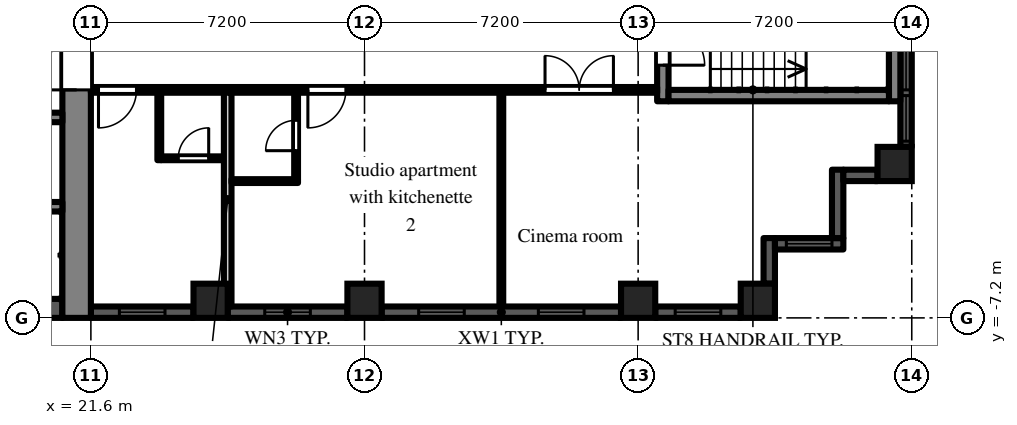
"""IFC4 building model, lengths in metres.
Left out: names, types, materials, properties, quantities, classifications, styles, units other than length and angle.
Written with IfcOpenShell. Run it as: python <this file> out.ifc"""

import sys

from ifc_helpers import new_model, si_unit, direction, frame, frame_2d, origin, origin_2d, place, context, subcontext, project, spatial, rectangle, extrude, element, fill, save


model = new_model("IFC4")
c1 = context("Model", 3, precision=1e-05, world=origin(), true_north=direction((0.0, 1.0)))
c2 = subcontext(c1, "Body", "Model", "MODEL_VIEW")
j1 = project(units=[si_unit("LENGTHUNIT", "METRE"), si_unit("PLANEANGLEUNIT", "RADIAN")], contexts=[c1])
p1 = place(None, origin())
s1 = spatial("IfcSite", under=j1, at=p1, CompositionType="ELEMENT")
p2 = place(p1, origin())
s2 = spatial("IfcBuilding", under=s1, at=p2, CompositionType="ELEMENT")
p3 = place(p2, frame((0.0, 0.0, 108.9)))
s3 = spatial("IfcBuildingStorey", under=s2, at=p3, CompositionType="ELEMENT", Elevation=108.9)
for number, where, z_axis, x_axis in (
    (1, (24.75, -6.75, 0.0), (0.0, 0.0, 1.0), (1.0, 0.0, 0.0)),
    (2, (28.8, -6.75, 0.0), (0.0, 0.0, 1.0), (1.0, 0.0, 0.0)),
    (3, (36.0, -6.75, 0.0), (0.0, 0.0, 1.0), (1.0, 0.0, 0.0)),
    (4, (39.15, -6.75, 0.0), (0.0, 0.0, 1.0), (1.0, 0.0, 0.0)),
    (5, (42.75, -3.15, 0.0), (0.0, 0.0, 1.0), (1.0, 0.0, 0.0)),
):
    element("IfcColumn", number, at=place(p3, frame(where, z_axis=z_axis, x_axis=x_axis)), inside=s3, PredefinedType="COLUMN", context=c2, shape_type="SweptSolid", body=[
        extrude(rectangle(XDim=0.9, YDim=0.9, at=origin_2d()), origin(), (0.0, 0.0, 1.0), 3.0),
    ])
p4 = place(p3, frame((21.6, -7.05, 0.0), z_axis=(0.0, 0.0, 1.0), x_axis=(1.0, 0.0, 0.0)))
e6 = element("IfcWall", 6, at=p4, inside=s3, PredefinedType="SOLIDWALL", context=c2, shape_type="SweptSolid", body=[
    extrude(rectangle(XDim=2.7, YDim=0.3, at=frame_2d((1.35, 0.0))), origin(), (0.0, 0.0, 1.0), 2.2),
])
p5 = place(p4, frame((0.75, 0.0, 0.2)))
e7 = element("IfcOpeningElement", 7, at=p5, cuts=e6, PredefinedType="OPENING", context=c2, shape_type="SweptSolid", body=[
    extrude(rectangle(XDim=1.2, YDim=1.85, at=frame_2d((0.6, 0.925))), frame((0.0, 0.16, 0.0), z_axis=(0.0, -1.0, 0.0), x_axis=(1.0, 0.0, 0.0)), (0.0, 0.0, 1.0), 0.32),
])
p6 = place(p3, frame((25.2, -7.05, 0.0), z_axis=(0.0, 0.0, 1.0), x_axis=(1.0, 0.0, 0.0)))
e8 = element("IfcWall", 8, at=p6, inside=s3, PredefinedType="SOLIDWALL", context=c2, shape_type="SweptSolid", body=[
    extrude(rectangle(XDim=3.15, YDim=0.3, at=frame_2d((1.575, 0.0))), origin(), (0.0, 0.0, 1.0), 2.2),
])
p7 = place(p6, frame((0.975, 0.0, 0.2)))
e9 = element("IfcOpeningElement", 9, at=p7, cuts=e8, PredefinedType="OPENING", context=c2, shape_type="SweptSolid", body=[
    extrude(rectangle(XDim=1.2, YDim=1.85, at=frame_2d((0.6, 0.925))), frame((0.0, 0.16, 0.0), z_axis=(0.0, -1.0, 0.0), x_axis=(1.0, 0.0, 0.0)), (0.0, 0.0, 1.0), 0.32),
])
p8 = place(p3, frame((29.25, -7.05, 0.0), z_axis=(0.0, 0.0, 1.0), x_axis=(1.0, 0.0, 0.0)))
e10 = element("IfcWall", 10, at=p8, inside=s3, PredefinedType="SOLIDWALL", context=c2, shape_type="SweptSolid", body=[
    extrude(rectangle(XDim=6.3, YDim=0.3, at=frame_2d((3.15, 0.0))), origin(), (0.0, 0.0, 1.0), 2.2),
])
p9 = place(p8, frame((0.975, 0.0, 0.2)))
e11 = element("IfcOpeningElement", 11, at=p9, cuts=e10, PredefinedType="OPENING", context=c2, shape_type="SweptSolid", body=[
    extrude(rectangle(XDim=1.2, YDim=1.85, at=frame_2d((0.6, 0.925))), frame((0.0, 0.16, 0.0), z_axis=(0.0, -1.0, 0.0), x_axis=(1.0, 0.0, 0.0)), (0.0, 0.0, 1.0), 0.32),
])
p10 = place(p8, frame((4.125, 0.0, 0.2)))
e12 = element("IfcOpeningElement", 12, at=p10, cuts=e10, PredefinedType="OPENING", context=c2, shape_type="SweptSolid", body=[
    extrude(rectangle(XDim=1.2, YDim=1.85, at=frame_2d((0.6, 0.925))), frame((0.0, 0.16, 0.0), z_axis=(0.0, -1.0, 0.0), x_axis=(1.0, 0.0, 0.0)), (0.0, 0.0, 1.0), 0.32),
])
p11 = place(p3, frame((36.45, -7.05, 0.0), z_axis=(0.0, 0.0, 1.0), x_axis=(1.0, 0.0, 0.0)))
e13 = element("IfcWall", 13, at=p11, inside=s3, PredefinedType="SOLIDWALL", context=c2, shape_type="SweptSolid", body=[
    extrude(rectangle(XDim=2.25, YDim=0.3, at=frame_2d((1.125, 0.0))), origin(), (0.0, 0.0, 1.0), 2.2),
])
p12 = place(p11, frame((0.525, 0.0, 0.2)))
e14 = element("IfcOpeningElement", 14, at=p12, cuts=e13, PredefinedType="OPENING", context=c2, shape_type="SweptSolid", body=[
    extrude(rectangle(XDim=1.2, YDim=1.85, at=frame_2d((0.6, 0.925))), frame((0.0, 0.16, 0.0), z_axis=(0.0, -1.0, 0.0), x_axis=(1.0, 0.0, 0.0)), (0.0, 0.0, 1.0), 0.32),
])
p13 = place(p3, frame((39.45, -6.3, 0.0), z_axis=(0.0, 0.0, 1.0), x_axis=(0.0, 1.0, 0.0)))
e15 = element("IfcWall", 15, at=p13, inside=s3, PredefinedType="SOLIDWALL", context=c2, shape_type="SweptSolid", body=[
    extrude(rectangle(XDim=1.2, YDim=0.3, at=frame_2d((0.6, 0.0))), origin(), (0.0, 0.0, 1.0), 2.55),
])
p14 = place(p3, frame((39.6, -5.25, 0.0), z_axis=(0.0, 0.0, 1.0), x_axis=(1.0, 0.0, 0.0)))
e16 = element("IfcWall", 16, at=p14, inside=s3, PredefinedType="SOLIDWALL", context=c2, shape_type="SweptSolid", body=[
    extrude(rectangle(XDim=1.8, YDim=0.3, at=frame_2d((0.9, 0.0))), origin(), (0.0, 0.0, 1.0), 2.55),
])
p15 = place(p14, frame((0.3, 0.0, 0.2)))
e17 = element("IfcOpeningElement", 17, at=p15, cuts=e16, PredefinedType="OPENING", context=c2, shape_type="SweptSolid", body=[
    extrude(rectangle(XDim=1.2, YDim=1.85, at=frame_2d((0.6, 0.925))), frame((0.0, 0.16, 0.0), z_axis=(0.0, -1.0, 0.0), x_axis=(1.0, 0.0, 0.0)), (0.0, 0.0, 1.0), 0.32),
])
p16 = place(p3, frame((41.25, -5.1, 0.0), z_axis=(0.0, 0.0, 1.0), x_axis=(0.0, 1.0, 0.0)))
e18 = element("IfcWall", 18, at=p16, inside=s3, PredefinedType="SOLIDWALL", context=c2, shape_type="SweptSolid", body=[
    extrude(rectangle(XDim=1.8, YDim=0.3, at=frame_2d((0.9, 0.0))), origin(), (0.0, 0.0, 1.0), 2.55),
])
p17 = place(p3, frame((41.4, -3.45, 0.0), z_axis=(0.0, 0.0, 1.0), x_axis=(1.0, 0.0, 0.0)))
e19 = element("IfcWall", 19, at=p17, inside=s3, PredefinedType="SOLIDWALL", context=c2, shape_type="SweptSolid", body=[
    extrude(rectangle(XDim=0.9, YDim=0.3, at=frame_2d((0.45, 0.0))), origin(), (0.0, 0.0, 1.0), 2.55),
])
p18 = place(p3, frame((43.05, -2.7, 0.0), z_axis=(0.0, 0.0, 1.0), x_axis=(0.0, 1.0, 0.0)))
e20 = element("IfcWall", 20, at=p18, inside=s3, PredefinedType="SOLIDWALL", context=c2, shape_type="SweptSolid", body=[
    extrude(rectangle(XDim=5.4, YDim=0.3, at=frame_2d((2.7, 0.0))), origin(), (0.0, 0.0, 1.0), 2.2),
])
p19 = place(p18, frame((1.5, 0.0, 0.2)))
e21 = element("IfcOpeningElement", 21, at=p19, cuts=e20, PredefinedType="OPENING", context=c2, shape_type="SweptSolid", body=[
    extrude(rectangle(XDim=2.4, YDim=1.85, at=frame_2d((1.2, 0.925))), frame((0.0, 0.16, 0.0), z_axis=(0.0, -1.0, 0.0), x_axis=(1.0, 0.0, 0.0)), (0.0, 0.0, 1.0), 0.32),
])
p20 = place(p18, frame((0.15, 0.0, 0.2)))
e22 = element("IfcOpeningElement", 22, at=p20, cuts=e20, PredefinedType="OPENING", context=c2, shape_type="SweptSolid", body=[
    extrude(rectangle(XDim=1.2, YDim=1.85, at=frame_2d((0.6, 0.925))), frame((0.0, 0.16, 0.0), z_axis=(0.0, -1.0, 0.0), x_axis=(1.0, 0.0, 0.0)), (0.0, 0.0, 1.0), 0.32),
])
p21 = place(p18, frame((4.05, 0.0, 0.2)))
e23 = element("IfcOpeningElement", 23, at=p21, cuts=e20, PredefinedType="OPENING", context=c2, shape_type="SweptSolid", body=[
    extrude(rectangle(XDim=1.2, YDim=1.85, at=frame_2d((0.6, 0.925))), frame((0.0, 0.16, 0.0), z_axis=(0.0, -1.0, 0.0), x_axis=(1.0, 0.0, 0.0)), (0.0, 0.0, 1.0), 0.32),
])
p22 = place(p3, frame((21.225, -7.2, 0.0), z_axis=(0.0, 0.0, 1.0), x_axis=(0.0, 1.0, 0.0)))
e24 = element("IfcWall", 24, at=p22, inside=s3, PredefinedType="SHEAR", context=c2, shape_type="SweptSolid", body=[
    extrude(rectangle(XDim=14.4, YDim=0.75, at=frame_2d((7.2, 0.0))), origin(), (0.0, 0.0, 1.0), 2.55),
])
p23 = place(p22, frame((6.0, 0.0, 0.0)))
e25 = element("IfcOpeningElement", 25, at=p23, cuts=e24, PredefinedType="OPENING", context=c2, shape_type="SweptSolid", body=[
    extrude(rectangle(XDim=2.4, YDim=2.2, at=frame_2d((1.2, 1.1))), frame((0.0, 0.385, 0.0), z_axis=(0.0, -1.0, 0.0), x_axis=(1.0, 0.0, 0.0)), (0.0, 0.0, 1.0), 0.77),
])
p24 = place(p3, frame((7.9, -6.95, 0.0), z_axis=(0.0, 0.0, 1.0), x_axis=(1.0, 0.0, 0.0)))
e26 = element("IfcWall", 26, at=p24, inside=s3, PredefinedType="SHEAR", context=c2, shape_type="SweptSolid", body=[
    extrude(rectangle(XDim=12.95, YDim=0.5, at=frame_2d((6.475, 0.0))), origin(), (0.0, 0.0, 1.0), 2.55),
])
p25 = place(p3, frame((7.9, -1.925, 0.0), z_axis=(0.0, 0.0, 1.0), x_axis=(1.0, 0.0, 0.0)))
e27 = element("IfcWall", 27, at=p25, inside=s3, PredefinedType="SHEAR", context=c2, shape_type="SweptSolid", body=[
    extrude(rectangle(XDim=12.95, YDim=0.25, at=frame_2d((6.475, 0.0))), origin(), (0.0, 0.0, 1.0), 2.55),
])
p26 = place(p25, frame((4.825, 0.0, 0.0)))
e28 = element("IfcOpeningElement", 28, at=p26, cuts=e27, PredefinedType="OPENING", context=c2, shape_type="SweptSolid", body=[
    extrude(rectangle(XDim=1.1, YDim=2.1, at=frame_2d((0.55, 1.05))), frame((0.0, 0.135, 0.0), z_axis=(0.0, -1.0, 0.0), x_axis=(1.0, 0.0, 0.0)), (0.0, 0.0, 1.0), 0.27),
])
p27 = place(p25, frame((7.025, 0.0, 0.0)))
e29 = element("IfcOpeningElement", 29, at=p27, cuts=e27, PredefinedType="OPENING", context=c2, shape_type="SweptSolid", body=[
    extrude(rectangle(XDim=1.1, YDim=2.1, at=frame_2d((0.55, 1.05))), frame((0.0, 0.135, 0.0), z_axis=(0.0, -1.0, 0.0), x_axis=(1.0, 0.0, 0.0)), (0.0, 0.0, 1.0), 0.27),
])
p28 = place(p25, frame((9.225, 0.0, 0.0)))
e30 = element("IfcOpeningElement", 30, at=p28, cuts=e27, PredefinedType="OPENING", context=c2, shape_type="SweptSolid", body=[
    extrude(rectangle(XDim=1.1, YDim=2.1, at=frame_2d((0.55, 1.05))), frame((0.0, 0.135, 0.0), z_axis=(0.0, -1.0, 0.0), x_axis=(1.0, 0.0, 0.0)), (0.0, 0.0, 1.0), 0.27),
])
p29 = place(p25, frame((0.525, 0.0, 0.0)))
e31 = element("IfcOpeningElement", 31, at=p29, cuts=e27, PredefinedType="OPENING", context=c2, shape_type="SweptSolid", body=[
    extrude(rectangle(XDim=0.9, YDim=2.1, at=frame_2d((0.45, 1.05))), frame((0.0, 0.135, 0.0), z_axis=(0.0, -1.0, 0.0), x_axis=(1.0, 0.0, 0.0)), (0.0, 0.0, 1.0), 0.27),
])
p30 = place(p25, frame((2.625, 0.0, 0.0)))
e32 = element("IfcOpeningElement", 32, at=p30, cuts=e27, PredefinedType="OPENING", context=c2, shape_type="SweptSolid", body=[
    extrude(rectangle(XDim=1.1, YDim=2.1, at=frame_2d((0.55, 1.05))), frame((0.0, 0.135, 0.0), z_axis=(0.0, -1.0, 0.0), x_axis=(1.0, 0.0, 0.0)), (0.0, 0.0, 1.0), 0.27),
])
p31 = place(p3, frame((12.3, -4.275, 0.0), z_axis=(0.0, 0.0, 1.0), x_axis=(1.0, 0.0, 0.0)))
e33 = element("IfcWall", 33, at=p31, inside=s3, PredefinedType="SHEAR", context=c2, shape_type="SweptSolid", body=[
    extrude(rectangle(XDim=8.55, YDim=0.25, at=frame_2d((4.275, 0.0))), origin(), (0.0, 0.0, 1.0), 2.55),
])
p32 = place(p3, frame((36.65, -1.5, 0.0), z_axis=(0.0, 0.0, 1.0), x_axis=(0.0, 1.0, 0.0)))
e34 = element("IfcWall", 34, at=p32, inside=s3, PredefinedType="SHEAR", context=c2, shape_type="SweptSolid", body=[
    extrude(rectangle(XDim=3.0, YDim=0.3, at=frame_2d((1.5, 0.0))), origin(), (0.0, 0.0, 1.0), 2.55),
])
p33 = place(p32, frame((0.95, 0.0, 0.0)))
e35 = element("IfcOpeningElement", 35, at=p33, cuts=e34, PredefinedType="OPENING", context=c2, shape_type="SweptSolid", body=[
    extrude(rectangle(XDim=1.1, YDim=2.1, at=frame_2d((0.55, 1.05))), frame((0.0, 0.16, 0.0), z_axis=(0.0, -1.0, 0.0), x_axis=(1.0, 0.0, 0.0)), (0.0, 0.0, 1.0), 0.32),
])
p34 = place(p3, frame((42.75, -1.5, 0.0), z_axis=(0.0, 0.0, 1.0), x_axis=(0.0, 1.0, 0.0)))
e36 = element("IfcWall", 36, at=p34, inside=s3, PredefinedType="SHEAR", context=c2, shape_type="SweptSolid", body=[
    extrude(rectangle(XDim=3.0, YDim=0.3, at=frame_2d((1.5, 0.0))), origin(), (0.0, 0.0, 1.0), 2.55),
])
p35 = place(p3, frame((36.8, -1.35, 0.0), z_axis=(0.0, 0.0, 1.0), x_axis=(1.0, 0.0, 0.0)))
e37 = element("IfcWall", 37, at=p35, inside=s3, PredefinedType="SHEAR", context=c2, shape_type="SweptSolid", body=[
    extrude(rectangle(XDim=5.8, YDim=0.3, at=frame_2d((2.9, 0.0))), origin(), (0.0, 0.0, 1.0), 2.55),
])
p36 = place(p3, frame((21.6, -1.2, 0.0), z_axis=(0.0, 0.0, 1.0), x_axis=(1.0, 0.0, 0.0)))
e38 = element("IfcWall", 38, at=p36, inside=s3, PredefinedType="PARTITIONING", context=c2, shape_type="SweptSolid", body=[
    extrude(rectangle(XDim=14.9, YDim=0.15, at=frame_2d((7.45, 0.0))), origin(), (0.0, 0.0, 1.0), 2.55),
])
p37 = place(p36, frame((0.2, 0.0, 0.0)))
e39 = element("IfcOpeningElement", 39, at=p37, cuts=e38, PredefinedType="OPENING", context=c2, shape_type="SweptSolid", body=[
    extrude(rectangle(XDim=1.0, YDim=2.1, at=frame_2d((0.5, 1.05))), frame((0.0, 0.085, 0.0), z_axis=(0.0, -1.0, 0.0), x_axis=(1.0, 0.0, 0.0)), (0.0, 0.0, 1.0), 0.17),
])
p38 = place(p36, frame((5.71, 0.0, 0.0)))
e40 = element("IfcOpeningElement", 40, at=p38, cuts=e38, PredefinedType="OPENING", context=c2, shape_type="SweptSolid", body=[
    extrude(rectangle(XDim=1.0, YDim=2.1, at=frame_2d((0.5, 1.05))), frame((0.0, 0.085, 0.0), z_axis=(0.0, -1.0, 0.0), x_axis=(1.0, 0.0, 0.0)), (0.0, 0.0, 1.0), 0.17),
])
p39 = place(p36, frame((11.95, 0.0, 0.0)))
e41 = element("IfcOpeningElement", 41, at=p39, cuts=e38, PredefinedType="OPENING", context=c2, shape_type="SweptSolid", body=[
    extrude(rectangle(XDim=1.8, YDim=2.1, at=frame_2d((0.9, 1.05))), frame((0.0, 0.085, 0.0), z_axis=(0.0, -1.0, 0.0), x_axis=(1.0, 0.0, 0.0)), (0.0, 0.0, 1.0), 0.17),
])
p40 = place(p3, frame((23.4, -3.05, 0.0), z_axis=(0.0, 0.0, 1.0), x_axis=(0.0, 1.0, 0.0)))
e42 = element("IfcWall", 42, at=p40, inside=s3, PredefinedType="PARTITIONING", context=c2, shape_type="SweptSolid", body=[
    extrude(rectangle(XDim=1.775, YDim=0.1, at=frame_2d((0.888, 0.0))), origin(), (0.0, 0.0, 1.0), 2.55),
])
p41 = place(p3, frame((23.45, -3.0, 0.0), z_axis=(0.0, 0.0, 1.0), x_axis=(1.0, 0.0, 0.0)))
e43 = element("IfcWall", 43, at=p41, inside=s3, PredefinedType="PARTITIONING", context=c2, shape_type="SweptSolid", body=[
    extrude(rectangle(XDim=1.65, YDim=0.1, at=frame_2d((0.825, 0.0))), origin(), (0.0, 0.0, 1.0), 2.55),
])
p42 = place(p41, frame((0.45, 0.0, 0.0)))
e44 = element("IfcOpeningElement", 44, at=p42, cuts=e43, PredefinedType="OPENING", context=c2, shape_type="SweptSolid", body=[
    extrude(rectangle(XDim=0.8, YDim=2.1, at=frame_2d((0.4, 1.05))), frame((0.0, 0.06, 0.0), z_axis=(0.0, -1.0, 0.0), x_axis=(1.0, 0.0, 0.0)), (0.0, 0.0, 1.0), 0.12),
])
p43 = place(p3, frame((25.2, -6.9, 0.0), z_axis=(0.0, 0.0, 1.0), x_axis=(0.0, 1.0, 0.0)))
e45 = element("IfcWall", 45, at=p43, inside=s3, PredefinedType="PARTITIONING", context=c2, shape_type="SweptSolid", body=[
    extrude(rectangle(XDim=5.625, YDim=0.2, at=frame_2d((2.812, 0.0))), origin(), (0.0, 0.0, 1.0), 2.55),
])
p44 = place(p3, frame((25.3, -3.6, 0.0), z_axis=(0.0, 0.0, 1.0), x_axis=(1.0, 0.0, 0.0)))
e46 = element("IfcWall", 46, at=p44, inside=s3, PredefinedType="PARTITIONING", context=c2, shape_type="SweptSolid", body=[
    extrude(rectangle(XDim=1.75, YDim=0.1, at=frame_2d((0.875, 0.0))), origin(), (0.0, 0.0, 1.0), 2.55),
])
p45 = place(p3, frame((27.0, -3.55, 0.0), z_axis=(0.0, 0.0, 1.0), x_axis=(0.0, 1.0, 0.0)))
e47 = element("IfcWall", 47, at=p45, inside=s3, PredefinedType="PARTITIONING", context=c2, shape_type="SweptSolid", body=[
    extrude(rectangle(XDim=2.275, YDim=0.1, at=frame_2d((1.138, 0.0))), origin(), (0.0, 0.0, 1.0), 2.55),
])
p46 = place(p45, frame((0.75, 0.0, 0.0)))
e48 = element("IfcOpeningElement", 48, at=p46, cuts=e47, PredefinedType="OPENING", context=c2, shape_type="SweptSolid", body=[
    extrude(rectangle(XDim=0.8, YDim=2.1, at=frame_2d((0.4, 1.05))), frame((0.0, 0.06, 0.0), z_axis=(0.0, -1.0, 0.0), x_axis=(1.0, 0.0, 0.0)), (0.0, 0.0, 1.0), 0.12),
])
p47 = place(p3, frame((32.4, -6.9, 0.0), z_axis=(0.0, 0.0, 1.0), x_axis=(0.0, 1.0, 0.0)))
e49 = element("IfcWall", 49, at=p47, inside=s3, PredefinedType="PARTITIONING", context=c2, shape_type="SweptSolid", body=[
    extrude(rectangle(XDim=5.625, YDim=0.1, at=frame_2d((2.812, 0.0))), origin(), (0.0, 0.0, 1.0), 2.55),
])
p48 = place(p5, origin())
e50 = element("IfcWindow", 50, at=p48, inside=s3, PartitioningType="SINGLE_PANEL", PredefinedType="WINDOW", context=c2, shape_type="SweptSolid", body=[
    extrude(rectangle(XDim=1.2, YDim=1.85, at=frame_2d((0.6, 0.925))), frame((0.0, 0.03, 0.0), z_axis=(0.0, -1.0, 0.0), x_axis=(1.0, 0.0, 0.0)), (0.0, 0.0, 1.0), 0.06),
])
fill(e7, e50)
p49 = place(p7, origin())
e51 = element("IfcWindow", 51, at=p49, inside=s3, PartitioningType="SINGLE_PANEL", PredefinedType="WINDOW", context=c2, shape_type="SweptSolid", body=[
    extrude(rectangle(XDim=1.2, YDim=1.85, at=frame_2d((0.6, 0.925))), frame((0.0, 0.03, 0.0), z_axis=(0.0, -1.0, 0.0), x_axis=(1.0, 0.0, 0.0)), (0.0, 0.0, 1.0), 0.06),
])
fill(e9, e51)
p50 = place(p9, origin())
e52 = element("IfcWindow", 52, at=p50, inside=s3, PartitioningType="SINGLE_PANEL", PredefinedType="WINDOW", context=c2, shape_type="SweptSolid", body=[
    extrude(rectangle(XDim=1.2, YDim=1.85, at=frame_2d((0.6, 0.925))), frame((0.0, 0.03, 0.0), z_axis=(0.0, -1.0, 0.0), x_axis=(1.0, 0.0, 0.0)), (0.0, 0.0, 1.0), 0.06),
])
fill(e11, e52)
p51 = place(p10, origin())
e53 = element("IfcWindow", 53, at=p51, inside=s3, PartitioningType="SINGLE_PANEL", PredefinedType="WINDOW", context=c2, shape_type="SweptSolid", body=[
    extrude(rectangle(XDim=1.2, YDim=1.85, at=frame_2d((0.6, 0.925))), frame((0.0, 0.03, 0.0), z_axis=(0.0, -1.0, 0.0), x_axis=(1.0, 0.0, 0.0)), (0.0, 0.0, 1.0), 0.06),
])
fill(e12, e53)
p52 = place(p12, origin())
e54 = element("IfcWindow", 54, at=p52, inside=s3, PartitioningType="SINGLE_PANEL", PredefinedType="WINDOW", context=c2, shape_type="SweptSolid", body=[
    extrude(rectangle(XDim=1.2, YDim=1.85, at=frame_2d((0.6, 0.925))), frame((0.0, 0.03, 0.0), z_axis=(0.0, -1.0, 0.0), x_axis=(1.0, 0.0, 0.0)), (0.0, 0.0, 1.0), 0.06),
])
fill(e14, e54)
p53 = place(p15, origin())
e55 = element("IfcWindow", 55, at=p53, inside=s3, PartitioningType="SINGLE_PANEL", PredefinedType="WINDOW", context=c2, shape_type="SweptSolid", body=[
    extrude(rectangle(XDim=1.2, YDim=1.85, at=frame_2d((0.6, 0.925))), frame((0.0, 0.03, 0.0), z_axis=(0.0, -1.0, 0.0), x_axis=(1.0, 0.0, 0.0)), (0.0, 0.0, 1.0), 0.06),
])
fill(e17, e55)
p54 = place(p19, origin())
e56 = element("IfcWindow", 56, at=p54, inside=s3, PartitioningType="SINGLE_PANEL", PredefinedType="WINDOW", context=c2, shape_type="SweptSolid", body=[
    extrude(rectangle(XDim=2.4, YDim=1.85, at=frame_2d((1.2, 0.925))), frame((0.0, 0.03, 0.0), z_axis=(0.0, -1.0, 0.0), x_axis=(1.0, 0.0, 0.0)), (0.0, 0.0, 1.0), 0.06),
])
fill(e21, e56)
p55 = place(p20, origin())
e57 = element("IfcWindow", 57, at=p55, inside=s3, PartitioningType="SINGLE_PANEL", PredefinedType="WINDOW", context=c2, shape_type="SweptSolid", body=[
    extrude(rectangle(XDim=1.2, YDim=1.85, at=frame_2d((0.6, 0.925))), frame((0.0, 0.03, 0.0), z_axis=(0.0, -1.0, 0.0), x_axis=(1.0, 0.0, 0.0)), (0.0, 0.0, 1.0), 0.06),
])
fill(e22, e57)
p56 = place(p23, origin())
e58 = element("IfcDoor", 58, at=p56, inside=s3, OperationType="DOUBLE_DOOR_DOUBLE_SWING", PredefinedType="DOOR", context=c2, shape_type="SweptSolid", body=[
    extrude(rectangle(XDim=2.4, YDim=2.2, at=frame_2d((1.2, 1.1))), frame((0.0, 0.025, 0.0), z_axis=(0.0, -1.0, 0.0), x_axis=(1.0, 0.0, 0.0)), (0.0, 0.0, 1.0), 0.05),
])
fill(e25, e58)
p57 = place(p33, frame((1.1, 0.0, 0.0), z_axis=(0.0, 0.0, 1.0), x_axis=(-1.0, 0.0, 0.0)))
e59 = element("IfcDoor", 59, at=p57, inside=s3, OperationType="SINGLE_SWING_RIGHT", PredefinedType="DOOR", context=c2, shape_type="SweptSolid", body=[
    extrude(rectangle(XDim=1.1, YDim=2.1, at=frame_2d((0.55, 1.05))), frame((0.0, 0.025, 0.0), z_axis=(0.0, -1.0, 0.0), x_axis=(1.0, 0.0, 0.0)), (0.0, 0.0, 1.0), 0.05),
])
fill(e35, e59)
p58 = place(p42, origin())
e60 = element("IfcDoor", 60, at=p58, inside=s3, OperationType="SINGLE_SWING_RIGHT", PredefinedType="DOOR", context=c2, shape_type="SweptSolid", body=[
    extrude(rectangle(XDim=0.8, YDim=2.1, at=frame_2d((0.4, 1.05))), frame((0.0, 0.025, 0.0), z_axis=(0.0, -1.0, 0.0), x_axis=(1.0, 0.0, 0.0)), (0.0, 0.0, 1.0), 0.05),
])
fill(e44, e60)
p59 = place(p37, frame((1.0, 0.0, 0.0), z_axis=(0.0, 0.0, 1.0), x_axis=(-1.0, 0.0, 0.0)))
e61 = element("IfcDoor", 61, at=p59, inside=s3, OperationType="SINGLE_SWING_RIGHT", PredefinedType="DOOR", context=c2, shape_type="SweptSolid", body=[
    extrude(rectangle(XDim=1.0, YDim=2.1, at=frame_2d((0.5, 1.05))), frame((0.0, 0.025, 0.0), z_axis=(0.0, -1.0, 0.0), x_axis=(1.0, 0.0, 0.0)), (0.0, 0.0, 1.0), 0.05),
])
fill(e39, e61)
p60 = place(p46, origin())
e62 = element("IfcDoor", 62, at=p60, inside=s3, OperationType="SINGLE_SWING_LEFT", PredefinedType="DOOR", context=c2, shape_type="SweptSolid", body=[
    extrude(rectangle(XDim=0.8, YDim=2.1, at=frame_2d((0.4, 1.05))), frame((0.0, 0.025, 0.0), z_axis=(0.0, -1.0, 0.0), x_axis=(1.0, 0.0, 0.0)), (0.0, 0.0, 1.0), 0.05),
])
fill(e48, e62)
p61 = place(p38, frame((1.0, 0.0, 0.0), z_axis=(0.0, 0.0, 1.0), x_axis=(-1.0, 0.0, 0.0)))
e63 = element("IfcDoor", 63, at=p61, inside=s3, OperationType="SINGLE_SWING_RIGHT", PredefinedType="DOOR", context=c2, shape_type="SweptSolid", body=[
    extrude(rectangle(XDim=1.0, YDim=2.1, at=frame_2d((0.5, 1.05))), frame((0.0, 0.025, 0.0), z_axis=(0.0, -1.0, 0.0), x_axis=(1.0, 0.0, 0.0)), (0.0, 0.0, 1.0), 0.05),
])
fill(e40, e63)
p62 = place(p39, origin())
e64 = element("IfcDoor", 64, at=p62, inside=s3, OperationType="DOUBLE_DOOR_DOUBLE_SWING", PredefinedType="DOOR", context=c2, shape_type="SweptSolid", body=[
    extrude(rectangle(XDim=1.8, YDim=2.1, at=frame_2d((0.9, 1.05))), frame((0.0, 0.025, 0.0), z_axis=(0.0, -1.0, 0.0), x_axis=(1.0, 0.0, 0.0)), (0.0, 0.0, 1.0), 0.05),
])
fill(e41, e64)
save(model, sys.argv[1])
